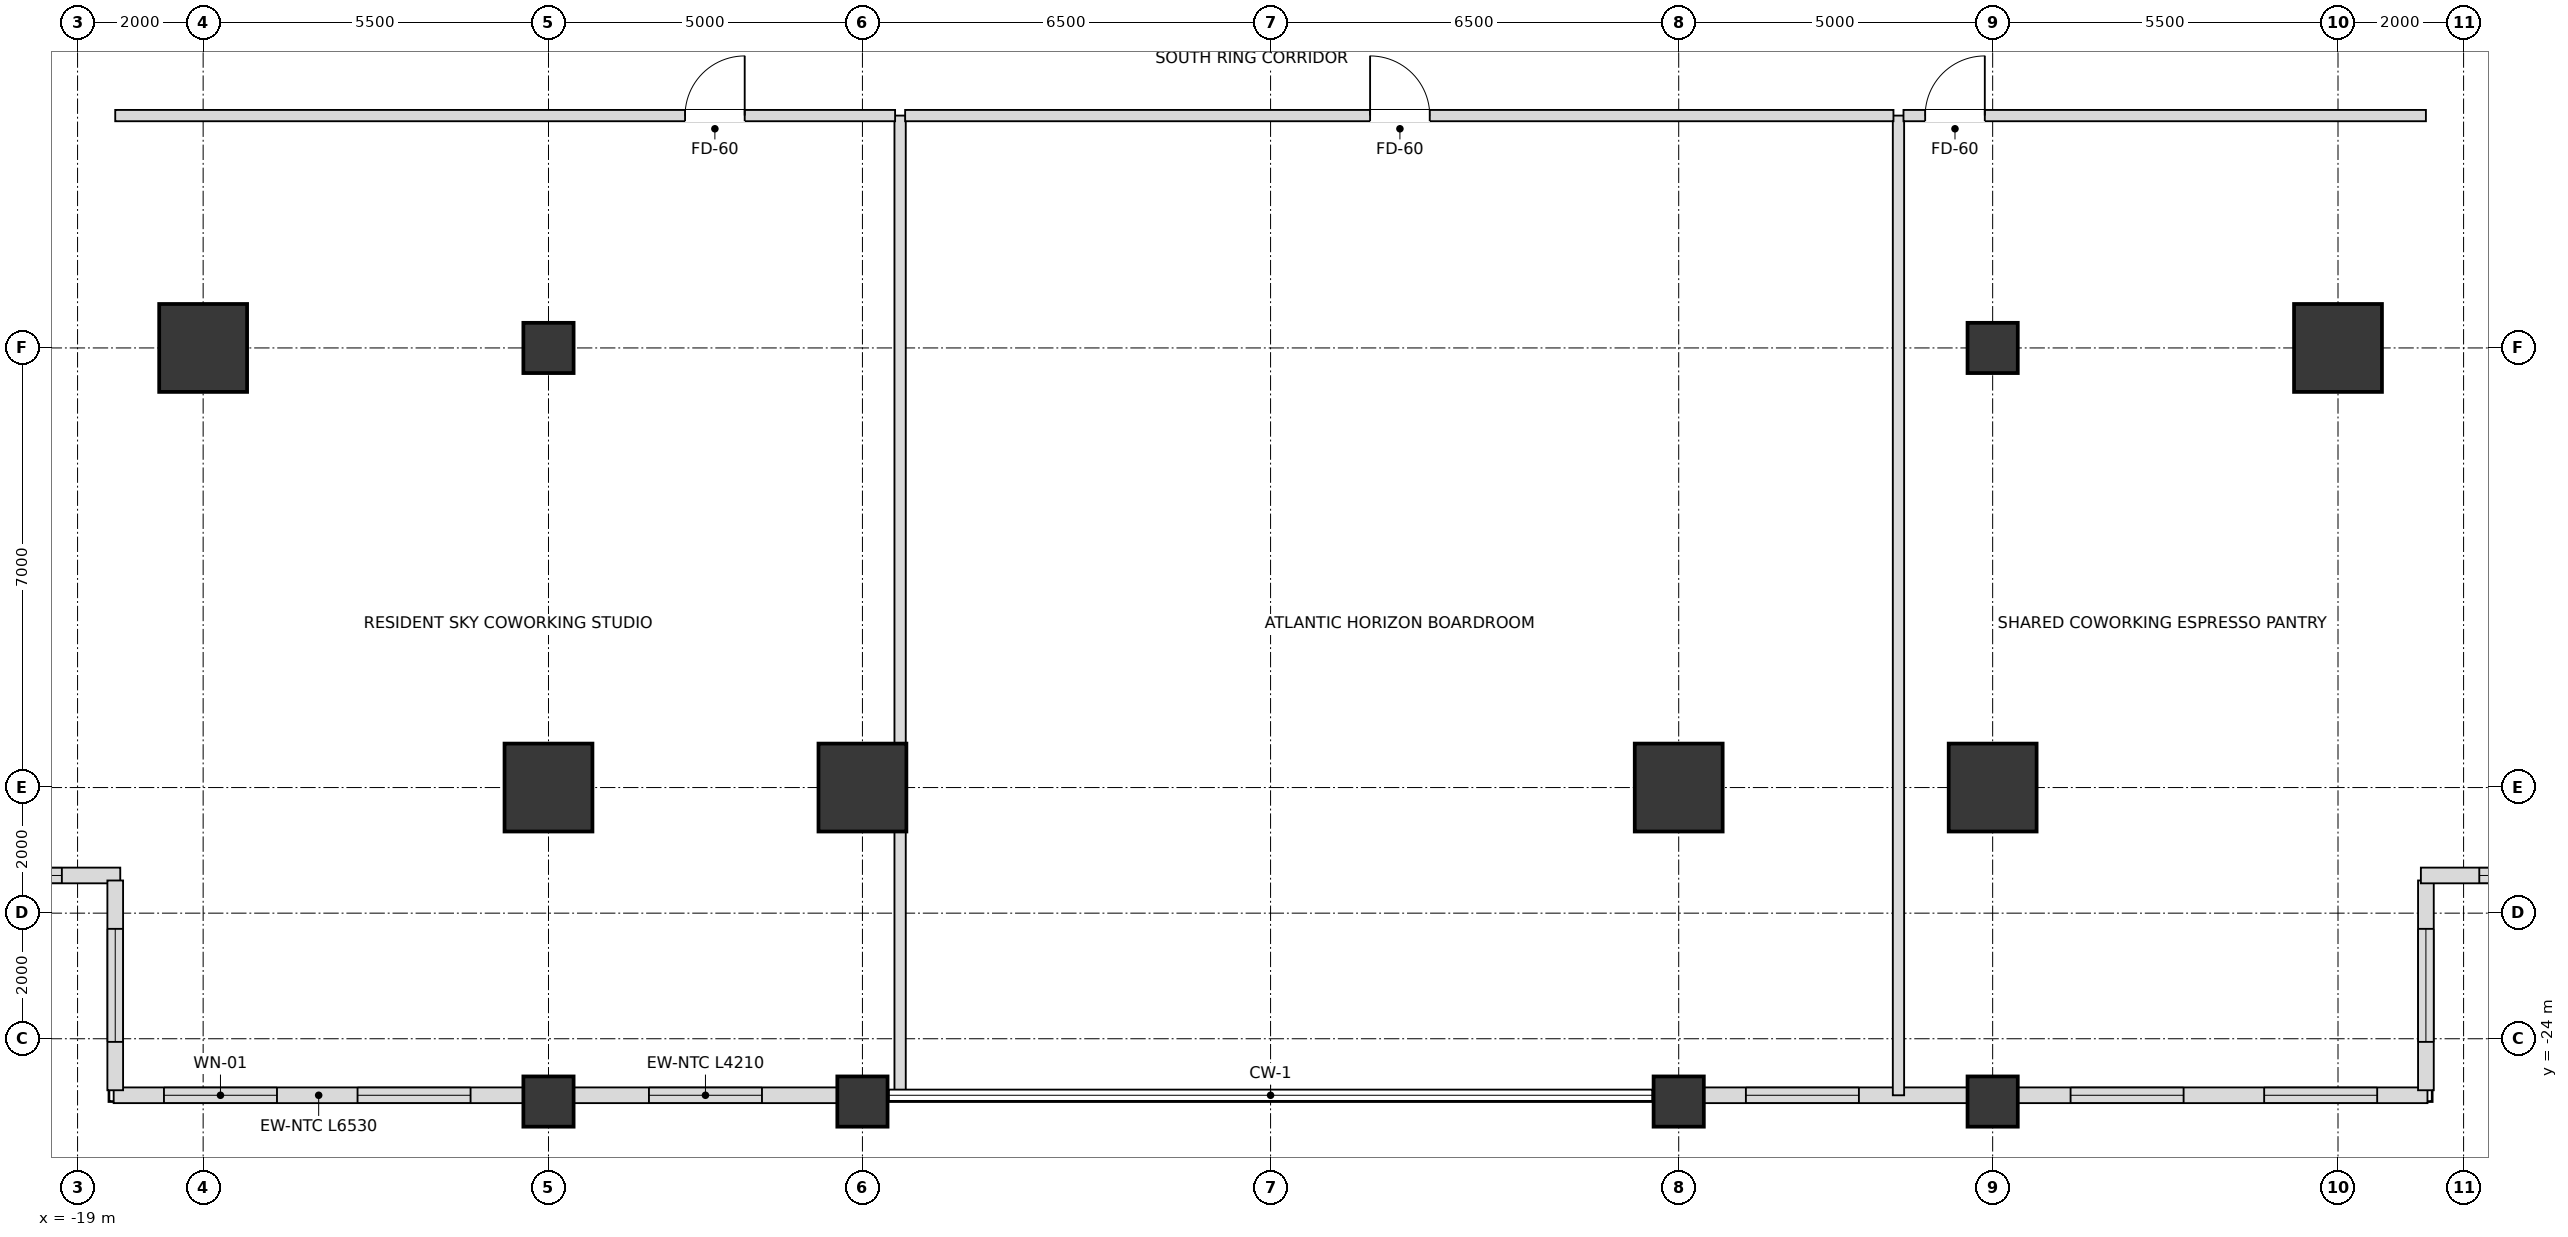
"""IFC4 building model, lengths in metres.
Left out: names, types, materials, properties, quantities, classifications, styles, units other than length and angle.
Written with IfcOpenShell. Run it as: python <this file> out.ifc"""

import sys

from ifc_helpers import new_model, si_unit, direction, frame, frame_2d, origin, origin_2d, place, context, subcontext, project, spatial, rectangle, extrude, element, fill, save


model = new_model("IFC4")
c1 = context("Model", 3, precision=1e-05, world=origin(), true_north=direction((0.0, 1.0)))
c2 = subcontext(c1, "Body", "Model", "MODEL_VIEW")
j1 = project(units=[si_unit("LENGTHUNIT", "METRE"), si_unit("PLANEANGLEUNIT", "RADIAN")], contexts=[c1])
p1 = place(None, origin())
s1 = spatial("IfcSite", under=j1, at=p1, CompositionType="ELEMENT")
p2 = place(p1, origin())
s2 = spatial("IfcBuilding", under=s1, at=p2, CompositionType="ELEMENT")
p3 = place(p2, frame((0.0, 0.0, 57.6)))
s3 = spatial("IfcBuildingStorey", under=s2, at=p3, CompositionType="ELEMENT", Elevation=57.6)
for number, where, z_axis, x_axis in (
    (1, (-11.5, -20.0, 0.0), (0.0, 0.0, 1.0), (1.0, 0.0, 0.0)),
    (2, (-6.5, -20.0, 0.0), (0.0, 0.0, 1.0), (1.0, 0.0, 0.0)),
    (3, (6.5, -20.0, 0.0), (0.0, 0.0, 1.0), (1.0, 0.0, 0.0)),
    (4, (11.5, -20.0, 0.0), (0.0, 0.0, 1.0), (1.0, 0.0, 0.0)),
    (5, (17.0, -13.0, 0.0), (0.0, 0.0, 1.0), (1.0, 0.0, 0.0)),
    (6, (-17.0, -13.0, 0.0), (0.0, 0.0, 1.0), (1.0, 0.0, 0.0)),
):
    element("IfcColumn", number, at=place(p3, frame(where, z_axis=z_axis, x_axis=x_axis)), inside=s3, PredefinedType="USERDEFINED", context=c2, shape_type="SweptSolid", body=[
        extrude(rectangle(XDim=1.4, YDim=1.4, at=origin_2d()), origin(), (0.0, 0.0, 1.0), 3.6),
    ])
for number, where, z_axis, x_axis in (
    (7, (-11.5, -13.0, 0.0), (0.0, 0.0, 1.0), (1.0, 0.0, 0.0)),
    (8, (11.5, -13.0, 0.0), (0.0, 0.0, 1.0), (1.0, 0.0, 0.0)),
    (9, (-11.5, -25.0, 0.0), (0.0, 0.0, 1.0), (1.0, 0.0, 0.0)),
    (10, (-6.5, -25.0, 0.0), (0.0, 0.0, 1.0), (1.0, 0.0, 0.0)),
    (11, (6.5, -25.0, 0.0), (0.0, 0.0, 1.0), (1.0, 0.0, 0.0)),
    (12, (11.5, -25.0, 0.0), (0.0, 0.0, 1.0), (1.0, 0.0, 0.0)),
):
    element("IfcColumn", number, at=place(p3, frame(where, z_axis=z_axis, x_axis=x_axis)), inside=s3, PredefinedType="COLUMN", context=c2, shape_type="SweptSolid", body=[
        extrude(rectangle(XDim=0.8, YDim=0.8, at=origin_2d()), origin(), (0.0, 0.0, 1.0), 3.6),
    ])
p4 = place(p3, frame((-18.425, -24.9, 0.0), z_axis=(0.0, 0.0, 1.0), x_axis=(1.0, 0.0, 0.0)))
e13 = element("IfcWall", 13, at=p4, inside=s3, PredefinedType="SOLIDWALL", context=c2, shape_type="SweptSolid", body=[
    extrude(rectangle(XDim=6.53, YDim=0.25, at=frame_2d((3.265, 0.0))), origin(), (0.0, 0.0, 1.0), 2.736),
])
p5 = place(p4, frame((0.801, 0.0, 0.72)))
e14 = element("IfcOpeningElement", 14, at=p5, cuts=e13, PredefinedType="OPENING", context=c2, shape_type="SweptSolid", body=[
    extrude(rectangle(XDim=1.8, YDim=1.68, at=frame_2d((0.9, 0.84))), frame((0.0, 0.135, 0.0), z_axis=(0.0, -1.0, 0.0), x_axis=(1.0, 0.0, 0.0)), (0.0, 0.0, 1.0), 0.27),
])
p6 = place(p4, frame((3.884, 0.0, 0.72)))
e15 = element("IfcOpeningElement", 15, at=p6, cuts=e13, PredefinedType="OPENING", context=c2, shape_type="SweptSolid", body=[
    extrude(rectangle(XDim=1.8, YDim=1.68, at=frame_2d((0.9, 0.84))), frame((0.0, 0.135, 0.0), z_axis=(0.0, -1.0, 0.0), x_axis=(1.0, 0.0, 0.0)), (0.0, 0.0, 1.0), 0.27),
])
p7 = place(p3, frame((-11.105, -24.9, 0.0), z_axis=(0.0, 0.0, 1.0), x_axis=(1.0, 0.0, 0.0)))
e16 = element("IfcWall", 16, at=p7, inside=s3, PredefinedType="SOLIDWALL", context=c2, shape_type="SweptSolid", body=[
    extrude(rectangle(XDim=4.21, YDim=0.25, at=frame_2d((2.105, 0.0))), origin(), (0.0, 0.0, 1.0), 2.736),
])
p8 = place(p7, frame((1.205, 0.0, 0.72)))
e17 = element("IfcOpeningElement", 17, at=p8, cuts=e16, PredefinedType="OPENING", context=c2, shape_type="SweptSolid", body=[
    extrude(rectangle(XDim=1.8, YDim=1.68, at=frame_2d((0.9, 0.84))), frame((0.0, 0.135, 0.0), z_axis=(0.0, -1.0, 0.0), x_axis=(1.0, 0.0, 0.0)), (0.0, 0.0, 1.0), 0.27),
])
p9 = place(p3, frame((6.895, -24.9, 0.0), z_axis=(0.0, 0.0, 1.0), x_axis=(1.0, 0.0, 0.0)))
e18 = element("IfcWall", 18, at=p9, inside=s3, PredefinedType="SOLIDWALL", context=c2, shape_type="SweptSolid", body=[
    extrude(rectangle(XDim=4.21, YDim=0.25, at=frame_2d((2.105, 0.0))), origin(), (0.0, 0.0, 1.0), 2.736),
])
p10 = place(p9, frame((0.675, 0.0, 0.72)))
e19 = element("IfcOpeningElement", 19, at=p10, cuts=e18, PredefinedType="OPENING", context=c2, shape_type="SweptSolid", body=[
    extrude(rectangle(XDim=1.8, YDim=1.68, at=frame_2d((0.9, 0.84))), frame((0.0, 0.135, 0.0), z_axis=(0.0, -1.0, 0.0), x_axis=(1.0, 0.0, 0.0)), (0.0, 0.0, 1.0), 0.27),
])
p11 = place(p3, frame((11.895, -24.9, 0.0), z_axis=(0.0, 0.0, 1.0), x_axis=(1.0, 0.0, 0.0)))
e20 = element("IfcWall", 20, at=p11, inside=s3, PredefinedType="SOLIDWALL", context=c2, shape_type="SweptSolid", body=[
    extrude(rectangle(XDim=6.53, YDim=0.25, at=frame_2d((3.265, 0.0))), origin(), (0.0, 0.0, 1.0), 2.736),
])
p12 = place(p11, frame((0.846, 0.0, 0.72)))
e21 = element("IfcOpeningElement", 21, at=p12, cuts=e20, PredefinedType="OPENING", context=c2, shape_type="SweptSolid", body=[
    extrude(rectangle(XDim=1.8, YDim=1.68, at=frame_2d((0.9, 0.84))), frame((0.0, 0.135, 0.0), z_axis=(0.0, -1.0, 0.0), x_axis=(1.0, 0.0, 0.0)), (0.0, 0.0, 1.0), 0.27),
])
p13 = place(p11, frame((3.929, 0.0, 0.72)))
e22 = element("IfcOpeningElement", 22, at=p13, cuts=e20, PredefinedType="OPENING", context=c2, shape_type="SweptSolid", body=[
    extrude(rectangle(XDim=1.8, YDim=1.68, at=frame_2d((0.9, 0.84))), frame((0.0, 0.135, 0.0), z_axis=(0.0, -1.0, 0.0), x_axis=(1.0, 0.0, 0.0)), (0.0, 0.0, 1.0), 0.27),
])
p14 = place(p3, frame((-21.98, -21.4, 0.0), z_axis=(0.0, 0.0, 1.0), x_axis=(1.0, 0.0, 0.0)))
e23 = element("IfcWall", 23, at=p14, inside=s3, PredefinedType="SOLIDWALL", context=c2, shape_type="SweptSolid", body=[
    extrude(rectangle(XDim=3.66, YDim=0.25, at=frame_2d((1.83, 0.0))), origin(), (0.0, 0.0, 1.0), 2.736),
])
p15 = place(p14, frame((0.93, 0.0, 0.72)))
e24 = element("IfcOpeningElement", 24, at=p15, cuts=e23, PredefinedType="OPENING", context=c2, shape_type="SweptSolid", body=[
    extrude(rectangle(XDim=1.8, YDim=1.68, at=frame_2d((0.9, 0.84))), frame((0.0, 0.135, 0.0), z_axis=(0.0, -1.0, 0.0), x_axis=(1.0, 0.0, 0.0)), (0.0, 0.0, 1.0), 0.27),
])
p16 = place(p3, frame((-18.4, -21.48, 0.0), z_axis=(0.0, 0.0, 1.0), x_axis=(0.0, -1.0, 0.0)))
e25 = element("IfcWall", 25, at=p16, inside=s3, PredefinedType="SOLIDWALL", context=c2, shape_type="SweptSolid", body=[
    extrude(rectangle(XDim=3.34, YDim=0.25, at=frame_2d((1.67, 0.0))), origin(), (0.0, 0.0, 1.0), 2.736),
])
p17 = place(p16, frame((0.77, 0.0, 0.72)))
e26 = element("IfcOpeningElement", 26, at=p17, cuts=e25, PredefinedType="OPENING", context=c2, shape_type="SweptSolid", body=[
    extrude(rectangle(XDim=1.8, YDim=1.68, at=frame_2d((0.9, 0.84))), frame((0.0, 0.135, 0.0), z_axis=(0.0, -1.0, 0.0), x_axis=(1.0, 0.0, 0.0)), (0.0, 0.0, 1.0), 0.27),
])
p18 = place(p3, frame((18.4, -24.82, 0.0), z_axis=(0.0, 0.0, 1.0), x_axis=(0.0, 1.0, 0.0)))
e27 = element("IfcWall", 27, at=p18, inside=s3, PredefinedType="SOLIDWALL", context=c2, shape_type="SweptSolid", body=[
    extrude(rectangle(XDim=3.34, YDim=0.25, at=frame_2d((1.67, 0.0))), origin(), (0.0, 0.0, 1.0), 2.736),
])
p19 = place(p18, frame((0.77, 0.0, 0.72)))
e28 = element("IfcOpeningElement", 28, at=p19, cuts=e27, PredefinedType="OPENING", context=c2, shape_type="SweptSolid", body=[
    extrude(rectangle(XDim=1.8, YDim=1.68, at=frame_2d((0.9, 0.84))), frame((0.0, 0.135, 0.0), z_axis=(0.0, -1.0, 0.0), x_axis=(1.0, 0.0, 0.0)), (0.0, 0.0, 1.0), 0.27),
])
p20 = place(p3, frame((18.32, -21.4, 0.0), z_axis=(0.0, 0.0, 1.0), x_axis=(1.0, 0.0, 0.0)))
e29 = element("IfcWall", 29, at=p20, inside=s3, PredefinedType="SOLIDWALL", context=c2, shape_type="SweptSolid", body=[
    extrude(rectangle(XDim=3.66, YDim=0.25, at=frame_2d((1.83, 0.0))), origin(), (0.0, 0.0, 1.0), 2.736),
])
p21 = place(p20, frame((0.93, 0.0, 0.72)))
e30 = element("IfcOpeningElement", 30, at=p21, cuts=e29, PredefinedType="OPENING", context=c2, shape_type="SweptSolid", body=[
    extrude(rectangle(XDim=1.8, YDim=1.68, at=frame_2d((0.9, 0.84))), frame((0.0, 0.135, 0.0), z_axis=(0.0, -1.0, 0.0), x_axis=(1.0, 0.0, 0.0)), (0.0, 0.0, 1.0), 0.27),
])
for number, where, z_axis, x_axis in (
    (31, (-5.9, -24.9, 0.0), (0.0, 0.0, 1.0), (0.0, 1.0, 0.0)),
    (32, (10.0, -24.9, 0.0), (0.0, 0.0, 1.0), (0.0, 1.0, 0.0)),
):
    element("IfcWall", number, at=place(p3, frame(where, z_axis=z_axis, x_axis=x_axis)), inside=s3, PredefinedType="PARTITIONING", context=c2, shape_type="SweptSolid", body=[
        extrude(rectangle(XDim=15.6, YDim=0.18, at=frame_2d((7.8, 0.0))), origin(), (0.0, 0.0, 1.0), 2.816),
    ])
p22 = place(p3, frame((-18.4, -9.3, 0.0), z_axis=(0.0, 0.0, 1.0), x_axis=(1.0, 0.0, 0.0)))
e33 = element("IfcWall", 33, at=p22, inside=s3, PredefinedType="PARTITIONING", context=c2, shape_type="SweptSolid", body=[
    extrude(rectangle(XDim=12.42, YDim=0.18, at=frame_2d((6.21, 0.0))), origin(), (0.0, 0.0, 1.0), 2.816),
])
p23 = place(p22, frame((9.075, 0.0, 0.0)))
e34 = element("IfcOpeningElement", 34, at=p23, cuts=e33, PredefinedType="OPENING", context=c2, shape_type="SweptSolid", body=[
    extrude(rectangle(XDim=0.95, YDim=2.15, at=frame_2d((0.475, 1.075))), frame((0.0, 0.1, 0.0), z_axis=(0.0, -1.0, 0.0), x_axis=(1.0, 0.0, 0.0)), (0.0, 0.0, 1.0), 0.2),
])
p24 = place(p3, frame((-5.82, -9.3, 0.0), z_axis=(0.0, 0.0, 1.0), x_axis=(1.0, 0.0, 0.0)))
e35 = element("IfcWall", 35, at=p24, inside=s3, PredefinedType="PARTITIONING", context=c2, shape_type="SweptSolid", body=[
    extrude(rectangle(XDim=15.74, YDim=0.18, at=frame_2d((7.87, 0.0))), origin(), (0.0, 0.0, 1.0), 2.816),
])
p25 = place(p24, frame((7.405, 0.0, 0.0)))
e36 = element("IfcOpeningElement", 36, at=p25, cuts=e35, PredefinedType="OPENING", context=c2, shape_type="SweptSolid", body=[
    extrude(rectangle(XDim=0.95, YDim=2.15, at=frame_2d((0.475, 1.075))), frame((0.0, 0.1, 0.0), z_axis=(0.0, -1.0, 0.0), x_axis=(1.0, 0.0, 0.0)), (0.0, 0.0, 1.0), 0.2),
])
p26 = place(p3, frame((10.08, -9.3, 0.0), z_axis=(0.0, 0.0, 1.0), x_axis=(1.0, 0.0, 0.0)))
e37 = element("IfcWall", 37, at=p26, inside=s3, PredefinedType="PARTITIONING", context=c2, shape_type="SweptSolid", body=[
    extrude(rectangle(XDim=8.32, YDim=0.18, at=frame_2d((4.16, 0.0))), origin(), (0.0, 0.0, 1.0), 2.816),
])
p27 = place(p26, frame((0.345, 0.0, 0.0)))
e38 = element("IfcOpeningElement", 38, at=p27, cuts=e37, PredefinedType="OPENING", context=c2, shape_type="SweptSolid", body=[
    extrude(rectangle(XDim=0.95, YDim=2.15, at=frame_2d((0.475, 1.075))), frame((0.0, 0.1, 0.0), z_axis=(0.0, -1.0, 0.0), x_axis=(1.0, 0.0, 0.0)), (0.0, 0.0, 1.0), 0.2),
])
p28 = place(p5, origin())
e39 = element("IfcWindow", 39, at=p28, inside=s3, PartitioningType="SINGLE_PANEL", PredefinedType="WINDOW", context=c2, shape_type="SweptSolid", body=[
    extrude(rectangle(XDim=1.8, YDim=1.68, at=frame_2d((0.9, 0.84))), frame((0.0, 0.03, 0.0), z_axis=(0.0, -1.0, 0.0), x_axis=(1.0, 0.0, 0.0)), (0.0, 0.0, 1.0), 0.06),
])
fill(e14, e39)
p29 = place(p6, origin())
e40 = element("IfcWindow", 40, at=p29, inside=s3, PartitioningType="SINGLE_PANEL", PredefinedType="WINDOW", context=c2, shape_type="SweptSolid", body=[
    extrude(rectangle(XDim=1.8, YDim=1.68, at=frame_2d((0.9, 0.84))), frame((0.0, 0.03, 0.0), z_axis=(0.0, -1.0, 0.0), x_axis=(1.0, 0.0, 0.0)), (0.0, 0.0, 1.0), 0.06),
])
fill(e15, e40)
p30 = place(p8, origin())
e41 = element("IfcWindow", 41, at=p30, inside=s3, PartitioningType="SINGLE_PANEL", PredefinedType="WINDOW", context=c2, shape_type="SweptSolid", body=[
    extrude(rectangle(XDim=1.8, YDim=1.68, at=frame_2d((0.9, 0.84))), frame((0.0, 0.03, 0.0), z_axis=(0.0, -1.0, 0.0), x_axis=(1.0, 0.0, 0.0)), (0.0, 0.0, 1.0), 0.06),
])
fill(e17, e41)
p31 = place(p10, origin())
e42 = element("IfcWindow", 42, at=p31, inside=s3, PartitioningType="SINGLE_PANEL", PredefinedType="WINDOW", context=c2, shape_type="SweptSolid", body=[
    extrude(rectangle(XDim=1.8, YDim=1.68, at=frame_2d((0.9, 0.84))), frame((0.0, 0.03, 0.0), z_axis=(0.0, -1.0, 0.0), x_axis=(1.0, 0.0, 0.0)), (0.0, 0.0, 1.0), 0.06),
])
fill(e19, e42)
p32 = place(p12, origin())
e43 = element("IfcWindow", 43, at=p32, inside=s3, PartitioningType="SINGLE_PANEL", PredefinedType="WINDOW", context=c2, shape_type="SweptSolid", body=[
    extrude(rectangle(XDim=1.8, YDim=1.68, at=frame_2d((0.9, 0.84))), frame((0.0, 0.03, 0.0), z_axis=(0.0, -1.0, 0.0), x_axis=(1.0, 0.0, 0.0)), (0.0, 0.0, 1.0), 0.06),
])
fill(e21, e43)
p33 = place(p13, origin())
e44 = element("IfcWindow", 44, at=p33, inside=s3, PartitioningType="SINGLE_PANEL", PredefinedType="WINDOW", context=c2, shape_type="SweptSolid", body=[
    extrude(rectangle(XDim=1.8, YDim=1.68, at=frame_2d((0.9, 0.84))), frame((0.0, 0.03, 0.0), z_axis=(0.0, -1.0, 0.0), x_axis=(1.0, 0.0, 0.0)), (0.0, 0.0, 1.0), 0.06),
])
fill(e22, e44)
p34 = place(p15, origin())
e45 = element("IfcWindow", 45, at=p34, inside=s3, PartitioningType="SINGLE_PANEL", PredefinedType="WINDOW", context=c2, shape_type="SweptSolid", body=[
    extrude(rectangle(XDim=1.8, YDim=1.68, at=frame_2d((0.9, 0.84))), frame((0.0, 0.03, 0.0), z_axis=(0.0, -1.0, 0.0), x_axis=(1.0, 0.0, 0.0)), (0.0, 0.0, 1.0), 0.06),
])
fill(e24, e45)
p35 = place(p17, origin())
e46 = element("IfcWindow", 46, at=p35, inside=s3, PartitioningType="SINGLE_PANEL", PredefinedType="WINDOW", context=c2, shape_type="SweptSolid", body=[
    extrude(rectangle(XDim=1.8, YDim=1.68, at=frame_2d((0.9, 0.84))), frame((0.0, 0.03, 0.0), z_axis=(0.0, -1.0, 0.0), x_axis=(1.0, 0.0, 0.0)), (0.0, 0.0, 1.0), 0.06),
])
fill(e26, e46)
p36 = place(p19, origin())
e47 = element("IfcWindow", 47, at=p36, inside=s3, PartitioningType="SINGLE_PANEL", PredefinedType="WINDOW", context=c2, shape_type="SweptSolid", body=[
    extrude(rectangle(XDim=1.8, YDim=1.68, at=frame_2d((0.9, 0.84))), frame((0.0, 0.03, 0.0), z_axis=(0.0, -1.0, 0.0), x_axis=(1.0, 0.0, 0.0)), (0.0, 0.0, 1.0), 0.06),
])
fill(e28, e47)
p37 = place(p21, origin())
e48 = element("IfcWindow", 48, at=p37, inside=s3, PartitioningType="SINGLE_PANEL", PredefinedType="WINDOW", context=c2, shape_type="SweptSolid", body=[
    extrude(rectangle(XDim=1.8, YDim=1.68, at=frame_2d((0.9, 0.84))), frame((0.0, 0.03, 0.0), z_axis=(0.0, -1.0, 0.0), x_axis=(1.0, 0.0, 0.0)), (0.0, 0.0, 1.0), 0.06),
])
fill(e30, e48)
p38 = place(p23, origin())
e49 = element("IfcDoor", 49, at=p38, inside=s3, OperationType="SINGLE_SWING_RIGHT", PredefinedType="DOOR", context=c2, shape_type="SweptSolid", body=[
    extrude(rectangle(XDim=0.95, YDim=2.15, at=frame_2d((0.475, 1.075))), frame((0.0, 0.025, 0.0), z_axis=(0.0, -1.0, 0.0), x_axis=(1.0, 0.0, 0.0)), (0.0, 0.0, 1.0), 0.05),
])
fill(e34, e49)
p39 = place(p25, origin())
e50 = element("IfcDoor", 50, at=p39, inside=s3, OperationType="SINGLE_SWING_LEFT", PredefinedType="DOOR", context=c2, shape_type="SweptSolid", body=[
    extrude(rectangle(XDim=0.95, YDim=2.15, at=frame_2d((0.475, 1.075))), frame((0.0, 0.025, 0.0), z_axis=(0.0, -1.0, 0.0), x_axis=(1.0, 0.0, 0.0)), (0.0, 0.0, 1.0), 0.05),
])
fill(e36, e50)
p40 = place(p27, origin())
e51 = element("IfcDoor", 51, at=p40, inside=s3, OperationType="SINGLE_SWING_RIGHT", PredefinedType="DOOR", context=c2, shape_type="SweptSolid", body=[
    extrude(rectangle(XDim=0.95, YDim=2.15, at=frame_2d((0.475, 1.075))), frame((0.0, 0.025, 0.0), z_axis=(0.0, -1.0, 0.0), x_axis=(1.0, 0.0, 0.0)), (0.0, 0.0, 1.0), 0.05),
])
fill(e38, e51)
save(model, sys.argv[1])
